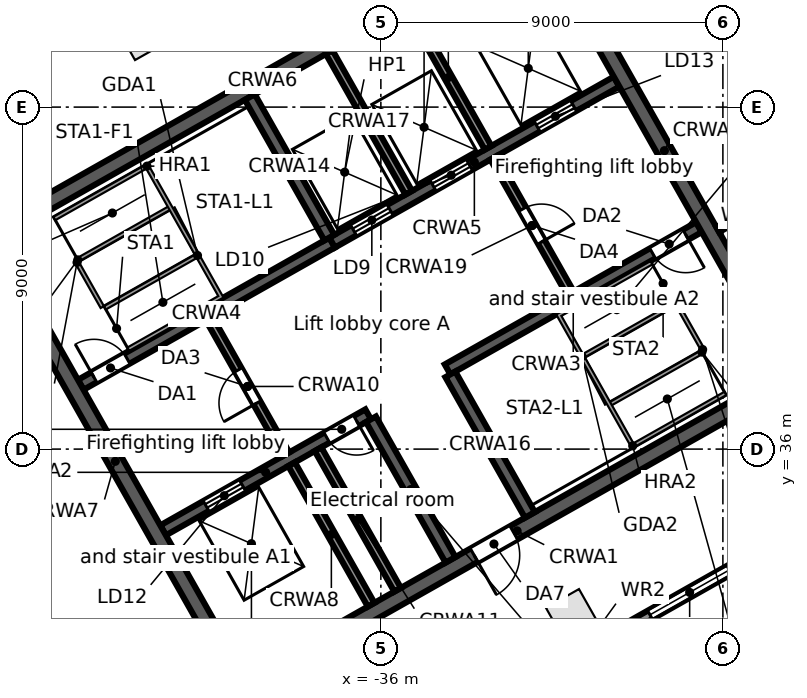
"""IFC4 building model, lengths in metres.
Left out: names, types, materials, properties, quantities, classifications, styles, units other than length and angle.
Written with IfcOpenShell. Run it as: python <this file> out.ifc"""

import sys

from ifc_helpers import new_model, si_unit, direction, frame, frame_2d, origin, origin_2d, place, context, subcontext, project, spatial, rectangle, extrude, element, fill, save


model = new_model("IFC4")
c1 = context("Model", 3, precision=1e-05, world=origin(), true_north=direction((0.0, 1.0)))
c2 = subcontext(c1, "Body", "Model", "MODEL_VIEW")
j1 = project(units=[si_unit("LENGTHUNIT", "METRE"), si_unit("PLANEANGLEUNIT", "RADIAN")], contexts=[c1])
p1 = place(None, origin())
s1 = spatial("IfcSite", under=j1, at=p1, CompositionType="ELEMENT")
p2 = place(p1, origin())
s2 = spatial("IfcBuilding", under=s1, at=p2, CompositionType="ELEMENT")
p3 = place(p2, frame((0.0, 0.0, 316.5)))
s3 = spatial("IfcBuildingStorey", under=s2, at=p3, CompositionType="ELEMENT", Elevation=316.5)
for number, where, z_axis, x_axis in (
    (1, (-42.28, 46.919, 0.0), (0.0, 0.0, 1.0), (-0.87, -0.492, 0.0)),
    (2, (-30.976, 31.635, 0.0), (0.0, 0.0, 1.0), (0.87, 0.492, 0.0)),
):
    element("IfcColumn", number, at=place(p3, frame(where, z_axis=z_axis, x_axis=x_axis)), inside=s3, PredefinedType="COLUMN", context=c2, shape_type="SweptSolid", body=[
        extrude(rectangle(XDim=1.0, YDim=1.0, at=origin_2d()), origin(), (0.0, 0.0, 1.0), 3.8),
    ])
p4 = place(p3, frame((-44.115, 26.507, 0.0), z_axis=(0.0, 0.0, 1.0), x_axis=(-0.857166583633, 0.515039268311, 0.0)))
e3 = element("IfcWall", 3, at=p4, inside=s3, PredefinedType="STANDARD", context=c2, shape_type="SweptSolid", body=[
    extrude(rectangle(XDim=17.106, YDim=0.25, at=frame_2d((8.553, 0.0))), origin(), (0.0, 0.0, 1.0), 3.52),
])
p5 = place(p4, frame((14.417, 0.0, 0.8)))
e4 = element("IfcOpeningElement", 4, at=p5, cuts=e3, PredefinedType="OPENING", context=c2, shape_type="SweptSolid", body=[
    extrude(rectangle(XDim=2.4, YDim=2.2, at=frame_2d((1.2, 1.1))), frame((0.0, 0.135, 0.0), z_axis=(0.0, -1.0, 0.0), x_axis=(1.0, 0.0, 0.0)), (0.0, 0.0, 1.0), 0.27),
])
p6 = place(p4, frame((11.584, 0.0, 0.8)))
e5 = element("IfcOpeningElement", 5, at=p6, cuts=e3, PredefinedType="OPENING", context=c2, shape_type="SweptSolid", body=[
    extrude(rectangle(XDim=2.4, YDim=2.2, at=frame_2d((1.2, 1.1))), frame((0.0, 0.135, 0.0), z_axis=(0.0, -1.0, 0.0), x_axis=(1.0, 0.0, 0.0)), (0.0, 0.0, 1.0), 0.27),
])
p7 = place(p4, frame((8.75, 0.0, 0.8)))
e6 = element("IfcOpeningElement", 6, at=p7, cuts=e3, PredefinedType="OPENING", context=c2, shape_type="SweptSolid", body=[
    extrude(rectangle(XDim=2.4, YDim=2.2, at=frame_2d((1.2, 1.1))), frame((0.0, 0.135, 0.0), z_axis=(0.0, -1.0, 0.0), x_axis=(1.0, 0.0, 0.0)), (0.0, 0.0, 1.0), 0.27),
])
p8 = place(p4, frame((5.917, 0.0, 0.8)))
e7 = element("IfcOpeningElement", 7, at=p8, cuts=e3, PredefinedType="OPENING", context=c2, shape_type="SweptSolid", body=[
    extrude(rectangle(XDim=2.4, YDim=2.2, at=frame_2d((1.2, 1.1))), frame((0.0, 0.135, 0.0), z_axis=(0.0, -1.0, 0.0), x_axis=(1.0, 0.0, 0.0)), (0.0, 0.0, 1.0), 0.27),
])
p9 = place(p4, frame((3.084, 0.0, 0.8)))
e8 = element("IfcOpeningElement", 8, at=p9, cuts=e3, PredefinedType="OPENING", context=c2, shape_type="SweptSolid", body=[
    extrude(rectangle(XDim=2.4, YDim=2.2, at=frame_2d((1.2, 1.1))), frame((0.0, 0.135, 0.0), z_axis=(0.0, -1.0, 0.0), x_axis=(1.0, 0.0, 0.0)), (0.0, 0.0, 1.0), 0.27),
])
p10 = place(p4, frame((0.25, 0.0, 0.8)))
e9 = element("IfcOpeningElement", 9, at=p10, cuts=e3, PredefinedType="OPENING", context=c2, shape_type="SweptSolid", body=[
    extrude(rectangle(XDim=2.4, YDim=2.2, at=frame_2d((1.2, 1.1))), frame((0.0, 0.135, 0.0), z_axis=(0.0, -1.0, 0.0), x_axis=(1.0, 0.0, 0.0)), (0.0, 0.0, 1.0), 0.27),
])
p11 = place(p3, frame((-3.017, 46.293, 0.0), z_axis=(0.0, 0.0, 1.0), x_axis=(-0.870355474887, -0.492423950812, 0.0)))
e10 = element("IfcWall", 10, at=p11, inside=s3, PredefinedType="STANDARD", context=c2, shape_type="SweptSolid", body=[
    extrude(rectangle(XDim=40.34, YDim=0.25, at=frame_2d((20.17, 0.0))), origin(), (0.0, 0.0, 1.0), 3.52),
])
p12 = place(p11, frame((37.428, 0.0, 0.8)))
e11 = element("IfcOpeningElement", 11, at=p12, cuts=e10, PredefinedType="OPENING", context=c2, shape_type="SweptSolid", body=[
    extrude(rectangle(XDim=2.4, YDim=2.2, at=frame_2d((1.2, 1.1))), frame((0.0, 0.135, 0.0), z_axis=(0.0, -1.0, 0.0), x_axis=(1.0, 0.0, 0.0)), (0.0, 0.0, 1.0), 0.27),
])
p13 = place(p11, frame((34.372, 0.0, 0.0)))
e12 = element("IfcOpeningElement", 12, at=p13, cuts=e10, PredefinedType="OPENING", context=c2, shape_type="SweptSolid", body=[
    extrude(rectangle(XDim=1.8, YDim=2.4, at=frame_2d((0.9, 1.2))), frame((0.0, 0.135, 0.0), z_axis=(0.0, -1.0, 0.0), x_axis=(1.0, 0.0, 0.0)), (0.0, 0.0, 1.0), 0.27),
])
p14 = place(p11, frame((30.716, 0.0, 0.8)))
e13 = element("IfcOpeningElement", 13, at=p14, cuts=e10, PredefinedType="OPENING", context=c2, shape_type="SweptSolid", body=[
    extrude(rectangle(XDim=2.4, YDim=2.2, at=frame_2d((1.2, 1.1))), frame((0.0, 0.135, 0.0), z_axis=(0.0, -1.0, 0.0), x_axis=(1.0, 0.0, 0.0)), (0.0, 0.0, 1.0), 0.27),
])
p15 = place(p11, frame((27.36, 0.0, 0.8)))
e14 = element("IfcOpeningElement", 14, at=p15, cuts=e10, PredefinedType="OPENING", context=c2, shape_type="SweptSolid", body=[
    extrude(rectangle(XDim=2.4, YDim=2.2, at=frame_2d((1.2, 1.1))), frame((0.0, 0.135, 0.0), z_axis=(0.0, -1.0, 0.0), x_axis=(1.0, 0.0, 0.0)), (0.0, 0.0, 1.0), 0.27),
])
p16 = place(p11, frame((24.304, 0.0, 0.0)))
e15 = element("IfcOpeningElement", 15, at=p16, cuts=e10, PredefinedType="OPENING", context=c2, shape_type="SweptSolid", body=[
    extrude(rectangle(XDim=1.8, YDim=2.4, at=frame_2d((0.9, 1.2))), frame((0.0, 0.135, 0.0), z_axis=(0.0, -1.0, 0.0), x_axis=(1.0, 0.0, 0.0)), (0.0, 0.0, 1.0), 0.27),
])
p17 = place(p11, frame((20.648, 0.0, 0.8)))
e16 = element("IfcOpeningElement", 16, at=p17, cuts=e10, PredefinedType="OPENING", context=c2, shape_type="SweptSolid", body=[
    extrude(rectangle(XDim=2.4, YDim=2.2, at=frame_2d((1.2, 1.1))), frame((0.0, 0.135, 0.0), z_axis=(0.0, -1.0, 0.0), x_axis=(1.0, 0.0, 0.0)), (0.0, 0.0, 1.0), 0.27),
])
p18 = place(p11, frame((17.292, 0.0, 0.8)))
e17 = element("IfcOpeningElement", 17, at=p18, cuts=e10, PredefinedType="OPENING", context=c2, shape_type="SweptSolid", body=[
    extrude(rectangle(XDim=2.4, YDim=2.2, at=frame_2d((1.2, 1.1))), frame((0.0, 0.135, 0.0), z_axis=(0.0, -1.0, 0.0), x_axis=(1.0, 0.0, 0.0)), (0.0, 0.0, 1.0), 0.27),
])
p19 = place(p11, frame((14.236, 0.0, 0.0)))
e18 = element("IfcOpeningElement", 18, at=p19, cuts=e10, PredefinedType="OPENING", context=c2, shape_type="SweptSolid", body=[
    extrude(rectangle(XDim=1.8, YDim=2.4, at=frame_2d((0.9, 1.2))), frame((0.0, 0.135, 0.0), z_axis=(0.0, -1.0, 0.0), x_axis=(1.0, 0.0, 0.0)), (0.0, 0.0, 1.0), 0.27),
])
p20 = place(p11, frame((10.58, 0.0, 0.8)))
e19 = element("IfcOpeningElement", 19, at=p20, cuts=e10, PredefinedType="OPENING", context=c2, shape_type="SweptSolid", body=[
    extrude(rectangle(XDim=2.4, YDim=2.2, at=frame_2d((1.2, 1.1))), frame((0.0, 0.135, 0.0), z_axis=(0.0, -1.0, 0.0), x_axis=(1.0, 0.0, 0.0)), (0.0, 0.0, 1.0), 0.27),
])
p21 = place(p11, frame((7.224, 0.0, 0.8)))
e20 = element("IfcOpeningElement", 20, at=p21, cuts=e10, PredefinedType="OPENING", context=c2, shape_type="SweptSolid", body=[
    extrude(rectangle(XDim=2.4, YDim=2.2, at=frame_2d((1.2, 1.1))), frame((0.0, 0.135, 0.0), z_axis=(0.0, -1.0, 0.0), x_axis=(1.0, 0.0, 0.0)), (0.0, 0.0, 1.0), 0.27),
])
p22 = place(p11, frame((4.168, 0.0, 0.0)))
e21 = element("IfcOpeningElement", 21, at=p22, cuts=e10, PredefinedType="OPENING", context=c2, shape_type="SweptSolid", body=[
    extrude(rectangle(XDim=1.8, YDim=2.4, at=frame_2d((0.9, 1.2))), frame((0.0, 0.135, 0.0), z_axis=(0.0, -1.0, 0.0), x_axis=(1.0, 0.0, 0.0)), (0.0, 0.0, 1.0), 0.27),
])
p23 = place(p11, frame((0.512, 0.0, 0.8)))
e22 = element("IfcOpeningElement", 22, at=p23, cuts=e10, PredefinedType="OPENING", context=c2, shape_type="SweptSolid", body=[
    extrude(rectangle(XDim=2.4, YDim=2.2, at=frame_2d((1.2, 1.1))), frame((0.0, 0.135, 0.0), z_axis=(0.0, -1.0, 0.0), x_axis=(1.0, 0.0, 0.0)), (0.0, 0.0, 1.0), 0.27),
])
p24 = place(p3, frame((-39.813, 29.662, 0.0), z_axis=(0.0, 0.0, 1.0), x_axis=(0.870350116061, 0.492433422375, 0.0)))
e23 = element("IfcWall", 23, at=p24, inside=s3, PredefinedType="SOLIDWALL", context=c2, shape_type="SweptSolid", body=[
    extrude(rectangle(XDim=17.0, YDim=0.4, at=frame_2d((8.5, 0.0))), origin(), (0.0, 0.0, 1.0), 3.52),
])
p25 = place(p24, frame((7.2, 0.0, 0.0)))
e24 = element("IfcOpeningElement", 24, at=p25, cuts=e23, PredefinedType="OPENING", context=c2, shape_type="SweptSolid", body=[
    extrude(rectangle(XDim=1.2, YDim=2.1, at=frame_2d((0.6, 1.05))), frame((0.0, 0.21, 0.0), z_axis=(0.0, -1.0, 0.0), x_axis=(1.0, 0.0, 0.0)), (0.0, 0.0, 1.0), 0.42),
])
p26 = place(p3, frame((-41.73, 33.863, 0.0), z_axis=(0.0, 0.0, 1.0), x_axis=(0.870350800578, 0.492432212525, 0.0)))
e25 = element("IfcWall", 25, at=p26, inside=s3, PredefinedType="SOLIDWALL", context=c2, shape_type="SweptSolid", body=[
    extrude(rectangle(XDim=6.2, YDim=0.3, at=frame_2d((3.1, 0.0))), origin(), (0.0, 0.0, 1.0), 3.52),
])
p27 = place(p26, frame((1.3, 0.0, 0.0)))
e26 = element("IfcOpeningElement", 26, at=p27, cuts=e25, PredefinedType="OPENING", context=c2, shape_type="SweptSolid", body=[
    extrude(rectangle(XDim=1.1, YDim=2.1, at=frame_2d((0.55, 1.05))), frame((0.0, 0.16, 0.0), z_axis=(0.0, -1.0, 0.0), x_axis=(1.0, 0.0, 0.0)), (0.0, 0.0, 1.0), 0.32),
])
p28 = place(p26, frame((4.95, 0.0, 0.0)))
e27 = element("IfcOpeningElement", 27, at=p28, cuts=e25, PredefinedType="OPENING", context=c2, shape_type="SweptSolid", body=[
    extrude(rectangle(XDim=0.9, YDim=2.1, at=frame_2d((0.45, 1.05))), frame((0.0, 0.16, 0.0), z_axis=(0.0, -1.0, 0.0), x_axis=(1.0, 0.0, 0.0)), (0.0, 0.0, 1.0), 0.32),
])
p29 = place(p3, frame((-34.245, 38.097, 0.0), z_axis=(0.0, 0.0, 1.0), x_axis=(0.870356351998, 0.492422400523, 0.0)))
e28 = element("IfcWall", 28, at=p29, inside=s3, PredefinedType="SOLIDWALL", context=c2, shape_type="SweptSolid", body=[
    extrude(rectangle(XDim=7.6, YDim=0.3, at=frame_2d((3.8, 0.0))), origin(), (0.0, 0.0, 1.0), 3.52),
])
p30 = place(p29, frame((6.2, 0.0, 0.0)))
e29 = element("IfcOpeningElement", 29, at=p30, cuts=e28, PredefinedType="OPENING", context=c2, shape_type="SweptSolid", body=[
    extrude(rectangle(XDim=1.0, YDim=2.1, at=frame_2d((0.5, 1.05))), frame((0.0, 0.16, 0.0), z_axis=(0.0, -1.0, 0.0), x_axis=(1.0, 0.0, 0.0)), (0.0, 0.0, 1.0), 0.32),
])
p31 = place(p3, frame((-43.897, 37.692, 0.0), z_axis=(0.0, 0.0, 1.0), x_axis=(0.870356351998, 0.492422400523, 0.0)))
e30 = element("IfcWall", 30, at=p31, inside=s3, PredefinedType="SOLIDWALL", context=c2, shape_type="SweptSolid", body=[
    extrude(rectangle(XDim=7.6, YDim=0.3, at=frame_2d((3.8, 0.0))), origin(), (0.0, 0.0, 1.0), 3.52),
])
p32 = place(p31, frame((0.4, 0.0, 0.0)))
e31 = element("IfcOpeningElement", 31, at=p32, cuts=e30, PredefinedType="OPENING", context=c2, shape_type="SweptSolid", body=[
    extrude(rectangle(XDim=1.0, YDim=2.1, at=frame_2d((0.5, 1.05))), frame((0.0, 0.16, 0.0), z_axis=(0.0, -1.0, 0.0), x_axis=(1.0, 0.0, 0.0)), (0.0, 0.0, 1.0), 0.32),
])
p33 = place(p3, frame((-37.282, 41.435, 0.0), z_axis=(0.0, 0.0, 1.0), x_axis=(0.870361315115, 0.492413628113, 0.0)))
e32 = element("IfcWall", 32, at=p33, inside=s3, PredefinedType="SOLIDWALL", context=c2, shape_type="SweptSolid", body=[
    extrude(rectangle(XDim=8.6, YDim=0.3, at=frame_2d((4.3, 0.0))), origin(), (0.0, 0.0, 1.0), 3.52),
])
p34 = place(p33, frame((0.65, 0.0, 0.0)))
e33 = element("IfcOpeningElement", 33, at=p34, cuts=e32, PredefinedType="OPENING", context=c2, shape_type="SweptSolid", body=[
    extrude(rectangle(XDim=1.1, YDim=2.1, at=frame_2d((0.55, 1.05))), frame((0.0, 0.16, 0.0), z_axis=(0.0, -1.0, 0.0), x_axis=(1.0, 0.0, 0.0)), (0.0, 0.0, 1.0), 0.32),
])
p35 = place(p33, frame((3.05, 0.0, 0.0)))
e34 = element("IfcOpeningElement", 34, at=p35, cuts=e32, PredefinedType="OPENING", context=c2, shape_type="SweptSolid", body=[
    extrude(rectangle(XDim=1.1, YDim=2.1, at=frame_2d((0.55, 1.05))), frame((0.0, 0.16, 0.0), z_axis=(0.0, -1.0, 0.0), x_axis=(1.0, 0.0, 0.0)), (0.0, 0.0, 1.0), 0.32),
])
p36 = place(p33, frame((6.2, 0.0, 0.0)))
e35 = element("IfcOpeningElement", 35, at=p36, cuts=e32, PredefinedType="OPENING", context=c2, shape_type="SweptSolid", body=[
    extrude(rectangle(XDim=1.1, YDim=2.1, at=frame_2d((0.55, 1.05))), frame((0.0, 0.16, 0.0), z_axis=(0.0, -1.0, 0.0), x_axis=(1.0, 0.0, 0.0)), (0.0, 0.0, 1.0), 0.32),
])
p37 = place(p3, frame((-46.51, 41.499, 0.0), z_axis=(0.0, 0.0, 1.0), x_axis=(0.870356271124, 0.492422543467, 0.0)))
e36 = element("IfcWall", 36, at=p37, inside=s3, PredefinedType="SOLIDWALL", context=c2, shape_type="SweptSolid", body=[
    extrude(rectangle(XDim=17.0, YDim=0.4, at=frame_2d((8.5, 0.0))), origin(), (0.0, 0.0, 1.0), 3.52),
])
p38 = place(p3, frame((-46.238, 41.423, 0.0), z_axis=(0.0, 0.0, 1.0), x_axis=(0.492421663121, -0.870356769198, 0.0)))
e37 = element("IfcWall", 37, at=p38, inside=s3, PredefinedType="SOLIDWALL", context=c2, shape_type="SweptSolid", body=[
    extrude(rectangle(XDim=13.2, YDim=0.4, at=frame_2d((6.6, 0.0))), origin(), (0.0, 0.0, 1.0), 3.52),
])
p39 = place(p3, frame((-38.349, 35.603, 0.0), z_axis=(0.0, 0.0, 1.0), x_axis=(0.492397924348, -0.870370199454, 0.0)))
e38 = element("IfcWall", 38, at=p39, inside=s3, PredefinedType="SOLIDWALL", context=c2, shape_type="SweptSolid", body=[
    extrude(rectangle(XDim=4.25, YDim=0.2, at=frame_2d((2.125, 0.0))), origin(), (0.0, 0.0, 1.0), 3.52),
])
p40 = place(p3, frame((-40.516, 39.433, 0.0), z_axis=(0.0, 0.0, 1.0), x_axis=(0.492453559952, -0.87033872216, 0.0)))
e39 = element("IfcWall", 39, at=p40, inside=s3, PredefinedType="PARTITIONING", context=c2, shape_type="SweptSolid", body=[
    extrude(rectangle(XDim=4.1, YDim=0.2, at=frame_2d((2.05, 0.0))), origin(), (0.0, 0.0, 1.0), 3.52),
])
p41 = place(p40, frame((1.55, 0.0, 0.0)))
e40 = element("IfcOpeningElement", 40, at=p41, cuts=e39, PredefinedType="OPENING", context=c2, shape_type="SweptSolid", body=[
    extrude(rectangle(XDim=1.0, YDim=2.1, at=frame_2d((0.5, 1.05))), frame((0.0, 0.11, 0.0), z_axis=(0.0, -1.0, 0.0), x_axis=(1.0, 0.0, 0.0)), (0.0, 0.0, 1.0), 0.22),
])
p42 = place(p3, frame((-37.653, 35.997, 0.0), z_axis=(0.0, 0.0, 1.0), x_axis=(0.492422543467, -0.870356271124, 0.0)))
e41 = element("IfcWall", 41, at=p42, inside=s3, PredefinedType="SOLIDWALL", context=c2, shape_type="SweptSolid", body=[
    extrude(rectangle(XDim=4.25, YDim=0.2, at=frame_2d((2.125, 0.0))), origin(), (0.0, 0.0, 1.0), 3.52),
])
for number, where, z_axis, x_axis in (
    (42, (-36.26, 36.785, 0.0), (0.0, 0.0, 1.0), (0.492, -0.87, 0.0)),
    (43, (-39.449, 45.264, 0.0), (0.0, 0.0, 1.0), (0.492, -0.87, 0.0)),
    (44, (-34.171, 37.967, 0.0), (0.0, 0.0, 1.0), (0.492, -0.87, 0.0)),
):
    element("IfcWall", number, at=place(p3, frame(where, z_axis=z_axis, x_axis=x_axis)), inside=s3, PredefinedType="SOLIDWALL", context=c2, shape_type="SweptSolid", body=[
        extrude(rectangle(XDim=4.25, YDim=0.3, at=frame_2d((2.125, 0.0))), origin(), (0.0, 0.0, 1.0), 3.52),
    ])
p43 = place(p3, frame((-37.36, 46.446, 0.0), z_axis=(0.0, 0.0, 1.0), x_axis=(0.492422543467, -0.870356271124, 0.0)))
e45 = element("IfcWall", 45, at=p43, inside=s3, PredefinedType="SOLIDWALL", context=c2, shape_type="SweptSolid", body=[
    extrude(rectangle(XDim=4.25, YDim=0.2, at=frame_2d((2.125, 0.0))), origin(), (0.0, 0.0, 1.0), 3.52),
])
p44 = place(p3, frame((-33.031, 43.667, 0.0), z_axis=(0.0, 0.0, 1.0), x_axis=(0.492408451753, -0.87036424366, 0.0)))
e46 = element("IfcWall", 46, at=p44, inside=s3, PredefinedType="PARTITIONING", context=c2, shape_type="SweptSolid", body=[
    extrude(rectangle(XDim=4.1, YDim=0.2, at=frame_2d((2.05, 0.0))), origin(), (0.0, 0.0, 1.0), 3.52),
])
p45 = place(p44, frame((1.55, 0.0, 0.0)))
e47 = element("IfcOpeningElement", 47, at=p45, cuts=e46, PredefinedType="OPENING", context=c2, shape_type="SweptSolid", body=[
    extrude(rectangle(XDim=1.0, YDim=2.1, at=frame_2d((0.5, 1.05))), frame((0.0, 0.11, 0.0), z_axis=(0.0, -1.0, 0.0), x_axis=(1.0, 0.0, 0.0)), (0.0, 0.0, 1.0), 0.22),
])
p46 = place(p3, frame((-35.271, 47.628, 0.0), z_axis=(0.0, 0.0, 1.0), x_axis=(0.492422543467, -0.870356271124, 0.0)))
e48 = element("IfcWall", 48, at=p46, inside=s3, PredefinedType="SOLIDWALL", context=c2, shape_type="SweptSolid", body=[
    extrude(rectangle(XDim=4.25, YDim=0.2, at=frame_2d((2.125, 0.0))), origin(), (0.0, 0.0, 1.0), 3.52),
])
p47 = place(p3, frame((-31.79, 49.597, 0.0), z_axis=(0.0, 0.0, 1.0), x_axis=(0.492421663121, -0.870356769198, 0.0)))
e49 = element("IfcWall", 49, at=p47, inside=s3, PredefinedType="SOLIDWALL", context=c2, shape_type="SweptSolid", body=[
    extrude(rectangle(XDim=13.2, YDim=0.4, at=frame_2d((6.6, 0.0))), origin(), (0.0, 0.0, 1.0), 3.52),
])
p48 = place(p3, frame((-27.134, 41.776, 0.0), z_axis=(0.0, 0.0, 1.0), x_axis=(0.870429354291, 0.492293346683, 0.0)))
e50 = element("IfcWall", 50, at=p48, inside=s3, PredefinedType="PARTITIONING", context=c2, shape_type="SweptSolid", body=[
    extrude(rectangle(XDim=1.499, YDim=0.15, at=frame_2d((0.75, 0.0))), origin(), (0.0, 0.0, 1.0), 2.792),
])
p49 = place(p15, origin())
e51 = element("IfcWindow", 51, at=p49, inside=s3, PartitioningType="SINGLE_PANEL", PredefinedType="WINDOW", context=c2, shape_type="SweptSolid", body=[
    extrude(rectangle(XDim=2.4, YDim=2.2, at=frame_2d((1.2, 1.1))), frame((0.0, 0.03, 0.0), z_axis=(0.0, -1.0, 0.0), x_axis=(1.0, 0.0, 0.0)), (0.0, 0.0, 1.0), 0.06),
])
fill(e14, e51)
p50 = place(p34, origin())
e52 = element("IfcDoor", 52, at=p50, inside=s3, OperationType="DOUBLE_DOOR_SLIDING", PredefinedType="DOOR", context=c2, shape_type="SweptSolid", body=[
    extrude(rectangle(XDim=1.1, YDim=2.1, at=frame_2d((0.55, 1.05))), frame((0.0, 0.025, 0.0), z_axis=(0.0, -1.0, 0.0), x_axis=(1.0, 0.0, 0.0)), (0.0, 0.0, 1.0), 0.05),
])
fill(e33, e52)
p51 = place(p35, origin())
e53 = element("IfcDoor", 53, at=p51, inside=s3, OperationType="DOUBLE_DOOR_SLIDING", PredefinedType="DOOR", context=c2, shape_type="SweptSolid", body=[
    extrude(rectangle(XDim=1.1, YDim=2.1, at=frame_2d((0.55, 1.05))), frame((0.0, 0.025, 0.0), z_axis=(0.0, -1.0, 0.0), x_axis=(1.0, 0.0, 0.0)), (0.0, 0.0, 1.0), 0.05),
])
fill(e34, e53)
p52 = place(p36, origin())
e54 = element("IfcDoor", 54, at=p52, inside=s3, OperationType="DOUBLE_DOOR_SLIDING", PredefinedType="DOOR", context=c2, shape_type="SweptSolid", body=[
    extrude(rectangle(XDim=1.1, YDim=2.1, at=frame_2d((0.55, 1.05))), frame((0.0, 0.025, 0.0), z_axis=(0.0, -1.0, 0.0), x_axis=(1.0, 0.0, 0.0)), (0.0, 0.0, 1.0), 0.05),
])
fill(e35, e54)
p53 = place(p27, origin())
e55 = element("IfcDoor", 55, at=p53, inside=s3, OperationType="DOUBLE_DOOR_SLIDING", PredefinedType="DOOR", context=c2, shape_type="SweptSolid", body=[
    extrude(rectangle(XDim=1.1, YDim=2.1, at=frame_2d((0.55, 1.05))), frame((0.0, 0.025, 0.0), z_axis=(0.0, -1.0, 0.0), x_axis=(1.0, 0.0, 0.0)), (0.0, 0.0, 1.0), 0.05),
])
fill(e26, e55)
p54 = place(p32, origin())
e56 = element("IfcDoor", 56, at=p54, inside=s3, OperationType="SINGLE_SWING_LEFT", PredefinedType="DOOR", context=c2, shape_type="SweptSolid", body=[
    extrude(rectangle(XDim=1.0, YDim=2.1, at=frame_2d((0.5, 1.05))), frame((0.0, 0.025, 0.0), z_axis=(0.0, -1.0, 0.0), x_axis=(1.0, 0.0, 0.0)), (0.0, 0.0, 1.0), 0.05),
])
fill(e31, e56)
p55 = place(p30, frame((1.0, 0.0, 0.0), z_axis=(0.0, 0.0, 1.0), x_axis=(-1.0, 0.0, 0.0)))
e57 = element("IfcDoor", 57, at=p55, inside=s3, OperationType="SINGLE_SWING_LEFT", PredefinedType="DOOR", context=c2, shape_type="SweptSolid", body=[
    extrude(rectangle(XDim=1.0, YDim=2.1, at=frame_2d((0.5, 1.05))), frame((0.0, 0.025, 0.0), z_axis=(0.0, -1.0, 0.0), x_axis=(1.0, 0.0, 0.0)), (0.0, 0.0, 1.0), 0.05),
])
fill(e29, e57)
p56 = place(p41, frame((1.0, 0.0, 0.0), z_axis=(0.0, 0.0, 1.0), x_axis=(-1.0, 0.0, 0.0)))
e58 = element("IfcDoor", 58, at=p56, inside=s3, OperationType="SINGLE_SWING_LEFT", PredefinedType="DOOR", context=c2, shape_type="SweptSolid", body=[
    extrude(rectangle(XDim=1.0, YDim=2.1, at=frame_2d((0.5, 1.05))), frame((0.0, 0.025, 0.0), z_axis=(0.0, -1.0, 0.0), x_axis=(1.0, 0.0, 0.0)), (0.0, 0.0, 1.0), 0.05),
])
fill(e40, e58)
p57 = place(p45, origin())
e59 = element("IfcDoor", 59, at=p57, inside=s3, OperationType="SINGLE_SWING_RIGHT", PredefinedType="DOOR", context=c2, shape_type="SweptSolid", body=[
    extrude(rectangle(XDim=1.0, YDim=2.1, at=frame_2d((0.5, 1.05))), frame((0.0, 0.025, 0.0), z_axis=(0.0, -1.0, 0.0), x_axis=(1.0, 0.0, 0.0)), (0.0, 0.0, 1.0), 0.05),
])
fill(e47, e59)
p58 = place(p25, frame((1.2, 0.0, 0.0), z_axis=(0.0, 0.0, 1.0), x_axis=(-1.0, 0.0, 0.0)))
e60 = element("IfcDoor", 60, at=p58, inside=s3, OperationType="SINGLE_SWING_RIGHT", PredefinedType="DOOR", context=c2, shape_type="SweptSolid", body=[
    extrude(rectangle(XDim=1.2, YDim=2.1, at=frame_2d((0.6, 1.05))), frame((0.0, 0.025, 0.0), z_axis=(0.0, -1.0, 0.0), x_axis=(1.0, 0.0, 0.0)), (0.0, 0.0, 1.0), 0.05),
])
fill(e24, e60)
p59 = place(p28, frame((0.9, 0.0, 0.0), z_axis=(0.0, 0.0, 1.0), x_axis=(-1.0, 0.0, 0.0)))
e61 = element("IfcDoor", 61, at=p59, inside=s3, OperationType="SINGLE_SWING_LEFT", PredefinedType="DOOR", context=c2, shape_type="SweptSolid", body=[
    extrude(rectangle(XDim=0.9, YDim=2.1, at=frame_2d((0.45, 1.05))), frame((0.0, 0.025, 0.0), z_axis=(0.0, -1.0, 0.0), x_axis=(1.0, 0.0, 0.0)), (0.0, 0.0, 1.0), 0.05),
])
fill(e27, e61)
save(model, sys.argv[1])
